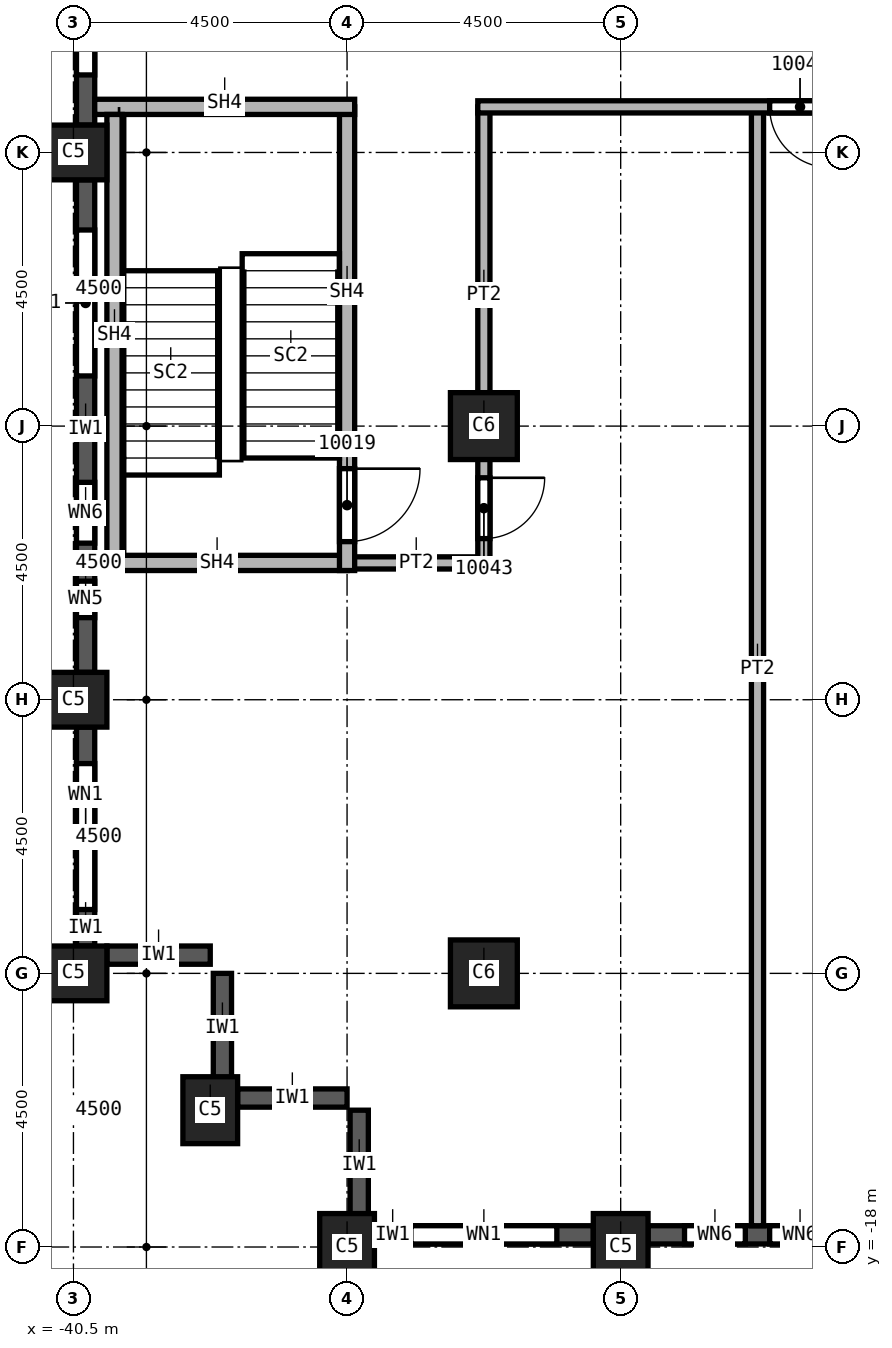
"""IFC4 building model, lengths in metres.
Left out: names, types, materials, properties, quantities, classifications, styles, units other than length and angle.
Written with IfcOpenShell. Run it as: python <this file> out.ifc"""

import sys

from ifc_helpers import new_model, si_unit, direction, frame, frame_2d, origin, origin_2d, place, context, subcontext, project, spatial, rectangle, extrude, element, fill, save


model = new_model("IFC4")
c1 = context("Model", 3, precision=1e-05, world=origin(), true_north=direction((0.0, 1.0)))
c2 = subcontext(c1, "Body", "Model", "MODEL_VIEW")
j1 = project(units=[si_unit("LENGTHUNIT", "METRE"), si_unit("PLANEANGLEUNIT", "RADIAN")], contexts=[c1])
p1 = place(None, origin())
s1 = spatial("IfcSite", under=j1, at=p1, CompositionType="ELEMENT")
p2 = place(p1, origin())
s2 = spatial("IfcBuilding", under=s1, at=p2, CompositionType="ELEMENT")
p3 = place(p2, frame((0.0, 0.0, 174.0)))
s3 = spatial("IfcBuildingStorey", under=s2, at=p3, CompositionType="ELEMENT", Elevation=174.0)
for number, where, z_axis, x_axis in (
    (1, (-40.5, 0.0, 0.0), (0.0, 0.0, 1.0), (0.0, 1.0, 0.0)),
    (2, (-40.5, -9.0, 0.0), (0.0, 0.0, 1.0), (0.0, 1.0, 0.0)),
    (3, (-40.5, -13.5, 0.0), (0.0, 0.0, 1.0), (0.0, 1.0, 0.0)),
    (4, (-38.25, -15.75, 0.0), (0.0, 0.0, 1.0), (1.0, 0.0, 0.0)),
    (5, (-31.5, -18.0, 0.0), (0.0, 0.0, 1.0), (1.0, 0.0, 0.0)),
    (6, (-36.0, -18.0, 0.0), (0.0, 0.0, 1.0), (1.0, 0.0, 0.0)),
):
    element("IfcColumn", number, at=place(p3, frame(where, z_axis=z_axis, x_axis=x_axis)), inside=s3, PredefinedType="COLUMN", context=c2, shape_type="SweptSolid", body=[
        extrude(rectangle(XDim=0.9, YDim=1.1, at=origin_2d()), origin(), (0.0, 0.0, 1.0), 3.59),
    ])
for number, where, z_axis, x_axis in (
    (7, (-33.75, -4.5, 0.0), (0.0, 0.0, 1.0), (1.0, 0.0, 0.0)),
    (8, (-33.75, -13.5, 0.0), (0.0, 0.0, 1.0), (1.0, 0.0, 0.0)),
):
    element("IfcColumn", number, at=place(p3, frame(where, z_axis=z_axis, x_axis=x_axis)), inside=s3, PredefinedType="COLUMN", context=c2, shape_type="SweptSolid", body=[
        extrude(rectangle(XDim=1.1, YDim=1.1, at=origin_2d()), origin(), (0.0, 0.0, 1.0), 3.59),
    ])
p4 = place(p3, frame((-39.95, -13.2, 0.0), z_axis=(0.0, 0.0, 1.0), x_axis=(1.0, 0.0, 0.0)))
e9 = element("IfcWall", 9, at=p4, inside=s3, PredefinedType="SOLIDWALL", context=c2, shape_type="SweptSolid", body=[
    extrude(rectangle(XDim=1.7, YDim=0.3, at=frame_2d((0.85, 0.0))), origin(), (0.0, 0.0, 1.0), 2.99),
])
for number, where, z_axis, x_axis in (
    (10, (-38.05, -15.3, 0.0), (0.0, 0.0, 1.0), (0.0, 1.0, 0.0)),
    (11, (-37.8, -15.55, 0.0), (0.0, 0.0, 1.0), (1.0, 0.0, 0.0)),
    (12, (-35.8, -17.55, 0.0), (0.0, 0.0, 1.0), (0.0, 1.0, 0.0)),
):
    element("IfcWall", number, at=place(p3, frame(where, z_axis=z_axis, x_axis=x_axis)), inside=s3, PredefinedType="SOLIDWALL", context=c2, shape_type="SweptSolid", body=[
        extrude(rectangle(XDim=1.8, YDim=0.3, at=frame_2d((0.9, 0.0))), origin(), (0.0, 0.0, 1.0), 2.99),
    ])
p5 = place(p3, frame((-40.3, 8.55, 0.0), z_axis=(0.0, 0.0, 1.0), x_axis=(0.0, -1.0, 0.0)))
e13 = element("IfcWall", 13, at=p5, inside=s3, PredefinedType="SOLIDWALL", context=c2, shape_type="SweptSolid", body=[
    extrude(rectangle(XDim=8.1, YDim=0.3, at=frame_2d((4.05, 0.0))), origin(), (0.0, 0.0, 1.0), 2.99),
])
p6 = place(p5, frame((0.825, 0.0, 0.8)))
e14 = element("IfcOpeningElement", 14, at=p6, cuts=e13, PredefinedType="OPENING", context=c2, shape_type="SweptSolid", body=[
    extrude(rectangle(XDim=2.4, YDim=1.95, at=frame_2d((1.2, 0.975))), frame((0.0, 0.15, 0.0), z_axis=(0.0, -1.0, 0.0), x_axis=(1.0, 0.0, 0.0)), (0.0, 0.0, 1.0), 0.3),
])
p7 = place(p5, frame((4.875, 0.0, 0.8)))
e15 = element("IfcOpeningElement", 15, at=p7, cuts=e13, PredefinedType="OPENING", context=c2, shape_type="SweptSolid", body=[
    extrude(rectangle(XDim=2.4, YDim=1.95, at=frame_2d((1.2, 0.975))), frame((0.0, 0.15, 0.0), z_axis=(0.0, -1.0, 0.0), x_axis=(1.0, 0.0, 0.0)), (0.0, 0.0, 1.0), 0.3),
])
p8 = place(p3, frame((-40.3, -0.45, 0.0), z_axis=(0.0, 0.0, 1.0), x_axis=(0.0, -1.0, 0.0)))
e16 = element("IfcWall", 16, at=p8, inside=s3, PredefinedType="SOLIDWALL", context=c2, shape_type="SweptSolid", body=[
    extrude(rectangle(XDim=8.1, YDim=0.3, at=frame_2d((4.05, 0.0))), origin(), (0.0, 0.0, 1.0), 2.99),
])
p9 = place(p8, frame((0.825, 0.0, 0.8)))
e17 = element("IfcOpeningElement", 17, at=p9, cuts=e16, PredefinedType="OPENING", context=c2, shape_type="SweptSolid", body=[
    extrude(rectangle(XDim=2.4, YDim=1.95, at=frame_2d((1.2, 0.975))), frame((0.0, 0.15, 0.0), z_axis=(0.0, -1.0, 0.0), x_axis=(1.0, 0.0, 0.0)), (0.0, 0.0, 1.0), 0.3),
])
p10 = place(p8, frame((4.975, 0.0, 0.8)))
e18 = element("IfcOpeningElement", 18, at=p10, cuts=e16, PredefinedType="OPENING", context=c2, shape_type="SweptSolid", body=[
    extrude(rectangle(XDim=1.0, YDim=1.95, at=frame_2d((0.5, 0.975))), frame((0.0, 0.15, 0.0), z_axis=(0.0, -1.0, 0.0), x_axis=(1.0, 0.0, 0.0)), (0.0, 0.0, 1.0), 0.3),
])
p11 = place(p8, frame((6.6, 0.0, 0.8)))
e19 = element("IfcOpeningElement", 19, at=p11, cuts=e16, PredefinedType="OPENING", context=c2, shape_type="SweptSolid", body=[
    extrude(rectangle(XDim=0.6, YDim=1.95, at=frame_2d((0.3, 0.975))), frame((0.0, 0.15, 0.0), z_axis=(0.0, -1.0, 0.0), x_axis=(1.0, 0.0, 0.0)), (0.0, 0.0, 1.0), 0.3),
])
p12 = place(p3, frame((-40.3, -9.45, 0.0), z_axis=(0.0, 0.0, 1.0), x_axis=(0.0, -1.0, 0.0)))
e20 = element("IfcWall", 20, at=p12, inside=s3, PredefinedType="SOLIDWALL", context=c2, shape_type="SweptSolid", body=[
    extrude(rectangle(XDim=3.6, YDim=0.3, at=frame_2d((1.8, 0.0))), origin(), (0.0, 0.0, 1.0), 2.99),
])
p13 = place(p12, frame((0.6, 0.0, 0.8)))
e21 = element("IfcOpeningElement", 21, at=p13, cuts=e20, PredefinedType="OPENING", context=c2, shape_type="SweptSolid", body=[
    extrude(rectangle(XDim=2.4, YDim=1.95, at=frame_2d((1.2, 0.975))), frame((0.0, 0.15, 0.0), z_axis=(0.0, -1.0, 0.0), x_axis=(1.0, 0.0, 0.0)), (0.0, 0.0, 1.0), 0.3),
])
p14 = place(p3, frame((-35.55, -17.8, 0.0), z_axis=(0.0, 0.0, 1.0), x_axis=(1.0, 0.0, 0.0)))
e22 = element("IfcWall", 22, at=p14, inside=s3, PredefinedType="SOLIDWALL", context=c2, shape_type="SweptSolid", body=[
    extrude(rectangle(XDim=3.6, YDim=0.3, at=frame_2d((1.8, 0.0))), origin(), (0.0, 0.0, 1.0), 2.99),
])
p15 = place(p14, frame((0.6, 0.0, 0.8)))
e23 = element("IfcOpeningElement", 23, at=p15, cuts=e22, PredefinedType="OPENING", context=c2, shape_type="SweptSolid", body=[
    extrude(rectangle(XDim=2.4, YDim=1.95, at=frame_2d((1.2, 0.975))), frame((0.0, 0.15, 0.0), z_axis=(0.0, -1.0, 0.0), x_axis=(1.0, 0.0, 0.0)), (0.0, 0.0, 1.0), 0.3),
])
p16 = place(p3, frame((-31.05, -17.8, 0.0), z_axis=(0.0, 0.0, 1.0), x_axis=(1.0, 0.0, 0.0)))
e24 = element("IfcWall", 24, at=p16, inside=s3, PredefinedType="SOLIDWALL", context=c2, shape_type="SweptSolid", body=[
    extrude(rectangle(XDim=3.6, YDim=0.3, at=frame_2d((1.8, 0.0))), origin(), (0.0, 0.0, 1.0), 2.99),
])
p17 = place(p16, frame((0.6, 0.0, 0.8)))
e25 = element("IfcOpeningElement", 25, at=p17, cuts=e24, PredefinedType="OPENING", context=c2, shape_type="SweptSolid", body=[
    extrude(rectangle(XDim=1.0, YDim=1.95, at=frame_2d((0.5, 0.975))), frame((0.0, 0.15, 0.0), z_axis=(0.0, -1.0, 0.0), x_axis=(1.0, 0.0, 0.0)), (0.0, 0.0, 1.0), 0.3),
])
p18 = place(p16, frame((2.0, 0.0, 0.8)))
e26 = element("IfcOpeningElement", 26, at=p18, cuts=e24, PredefinedType="OPENING", context=c2, shape_type="SweptSolid", body=[
    extrude(rectangle(XDim=1.0, YDim=1.95, at=frame_2d((0.5, 0.975))), frame((0.0, 0.15, 0.0), z_axis=(0.0, -1.0, 0.0), x_axis=(1.0, 0.0, 0.0)), (0.0, 0.0, 1.0), 0.3),
])
p19 = place(p3, frame((-33.75, -6.75, 0.0), z_axis=(0.0, 0.0, 1.0), x_axis=(-1.0, 0.0, 0.0)))
e27 = element("IfcWall", 27, at=p19, inside=s3, PredefinedType="PARTITIONING", context=c2, shape_type="SweptSolid", body=[
    extrude(rectangle(XDim=2.25, YDim=0.2, at=frame_2d((1.125, 0.0))), origin(), (0.0, 0.0, 1.0), 3.59),
])
p20 = place(p3, frame((-33.75, 0.75, 0.0), z_axis=(0.0, 0.0, 1.0), x_axis=(0.0, -1.0, 0.0)))
e28 = element("IfcWall", 28, at=p20, inside=s3, PredefinedType="PARTITIONING", context=c2, shape_type="SweptSolid", body=[
    extrude(rectangle(XDim=7.6, YDim=0.2, at=frame_2d((3.8, 0.0))), origin(), (0.0, 0.0, 1.0), 3.59),
])
p21 = place(p20, frame((6.1, 0.0, 0.0)))
e29 = element("IfcOpeningElement", 29, at=p21, cuts=e28, PredefinedType="OPENING", context=c2, shape_type="SweptSolid", body=[
    extrude(rectangle(XDim=1.0, YDim=2.1, at=frame_2d((0.5, 1.05))), frame((0.0, 0.1, 0.0), z_axis=(0.0, -1.0, 0.0), x_axis=(1.0, 0.0, 0.0)), (0.0, 0.0, 1.0), 0.2),
])
p22 = place(p3, frame((-29.25, 0.75, 0.0), z_axis=(0.0, 0.0, 1.0), x_axis=(0.0, -1.0, 0.0)))
e30 = element("IfcWall", 30, at=p22, inside=s3, PredefinedType="PARTITIONING", context=c2, shape_type="SweptSolid", body=[
    extrude(rectangle(XDim=18.4, YDim=0.2, at=frame_2d((9.2, 0.0))), origin(), (0.0, 0.0, 1.0), 3.59),
])
p23 = place(p3, frame((-15.4, 0.75, 0.0), z_axis=(0.0, 0.0, 1.0), x_axis=(-1.0, 0.0, 0.0)))
e31 = element("IfcWall", 31, at=p23, inside=s3, PredefinedType="PARTITIONING", context=c2, shape_type="SweptSolid", body=[
    extrude(rectangle(XDim=18.45, YDim=0.2, at=frame_2d((9.225, 0.0))), origin(), (0.0, 0.0, 1.0), 3.59),
])
p24 = place(p23, frame((3.55, 0.0, 0.0)))
e32 = element("IfcOpeningElement", 32, at=p24, cuts=e31, PredefinedType="OPENING", context=c2, shape_type="SweptSolid", body=[
    extrude(rectangle(XDim=1.0, YDim=2.1, at=frame_2d((0.5, 1.05))), frame((0.0, 0.1, 0.0), z_axis=(0.0, -1.0, 0.0), x_axis=(1.0, 0.0, 0.0)), (0.0, 0.0, 1.0), 0.2),
])
p25 = place(p23, frame((12.65, 0.0, 0.0)))
e33 = element("IfcOpeningElement", 33, at=p25, cuts=e31, PredefinedType="OPENING", context=c2, shape_type="SweptSolid", body=[
    extrude(rectangle(XDim=1.0, YDim=2.1, at=frame_2d((0.5, 1.05))), frame((0.0, 0.1, 0.0), z_axis=(0.0, -1.0, 0.0), x_axis=(1.0, 0.0, 0.0)), (0.0, 0.0, 1.0), 0.2),
])
p26 = place(p3, frame((-36.0, -6.75, 0.0), z_axis=(0.0, 0.0, 1.0), x_axis=(-1.0, 0.0, 0.0)))
e34 = element("IfcWall", 34, at=p26, inside=s3, PredefinedType="SOLIDWALL", context=c2, shape_type="SweptSolid", body=[
    extrude(rectangle(XDim=4.15, YDim=0.25, at=frame_2d((2.075, 0.0))), origin(), (0.0, 0.0, 1.0), 3.59),
])
p27 = place(p3, frame((-36.0, 0.75, 0.0), z_axis=(0.0, 0.0, 1.0), x_axis=(0.0, -1.0, 0.0)))
e35 = element("IfcWall", 35, at=p27, inside=s3, PredefinedType="SOLIDWALL", context=c2, shape_type="SweptSolid", body=[
    extrude(rectangle(XDim=7.625, YDim=0.25, at=frame_2d((3.812, 0.0))), origin(), (0.0, 0.0, 1.0), 3.59),
])
p28 = place(p27, frame((5.95, 0.0, 0.0)))
e36 = element("IfcOpeningElement", 36, at=p28, cuts=e35, PredefinedType="OPENING", context=c2, shape_type="SweptSolid", body=[
    extrude(rectangle(XDim=1.2, YDim=2.1, at=frame_2d((0.6, 1.05))), frame((0.0, 0.125, 0.0), z_axis=(0.0, -1.0, 0.0), x_axis=(1.0, 0.0, 0.0)), (0.0, 0.0, 1.0), 0.25),
])
p29 = place(p3, frame((-35.875, 0.75, 0.0), z_axis=(0.0, 0.0, 1.0), x_axis=(-1.0, 0.0, 0.0)))
e37 = element("IfcWall", 37, at=p29, inside=s3, PredefinedType="SOLIDWALL", context=c2, shape_type="SweptSolid", body=[
    extrude(rectangle(XDim=4.275, YDim=0.25, at=frame_2d((2.137, 0.0))), origin(), (0.0, 0.0, 1.0), 3.59),
])
p30 = place(p3, frame((-39.825, -6.625, 0.0), z_axis=(0.0, 0.0, 1.0), x_axis=(0.0, 1.0, 0.0)))
e38 = element("IfcWall", 38, at=p30, inside=s3, PredefinedType="SOLIDWALL", context=c2, shape_type="SweptSolid", body=[
    extrude(rectangle(XDim=7.25, YDim=0.25, at=frame_2d((3.625, 0.0))), origin(), (0.0, 0.0, 1.0), 3.59),
])
p31 = place(p7, origin())
e39 = element("IfcWindow", 39, at=p31, inside=s3, PartitioningType="SINGLE_PANEL", PredefinedType="WINDOW", context=c2, shape_type="SweptSolid", body=[
    extrude(rectangle(XDim=2.4, YDim=1.95, at=frame_2d((1.2, 0.975))), frame((0.0, 0.03, 0.0), z_axis=(0.0, -1.0, 0.0), x_axis=(1.0, 0.0, 0.0)), (0.0, 0.0, 1.0), 0.06),
])
fill(e15, e39)
p32 = place(p9, origin())
e40 = element("IfcWindow", 40, at=p32, inside=s3, PartitioningType="SINGLE_PANEL", PredefinedType="WINDOW", context=c2, shape_type="SweptSolid", body=[
    extrude(rectangle(XDim=2.4, YDim=1.95, at=frame_2d((1.2, 0.975))), frame((0.0, 0.03, 0.0), z_axis=(0.0, -1.0, 0.0), x_axis=(1.0, 0.0, 0.0)), (0.0, 0.0, 1.0), 0.06),
])
fill(e17, e40)
p33 = place(p13, origin())
e41 = element("IfcWindow", 41, at=p33, inside=s3, PartitioningType="SINGLE_PANEL", PredefinedType="WINDOW", context=c2, shape_type="SweptSolid", body=[
    extrude(rectangle(XDim=2.4, YDim=1.95, at=frame_2d((1.2, 0.975))), frame((0.0, 0.03, 0.0), z_axis=(0.0, -1.0, 0.0), x_axis=(1.0, 0.0, 0.0)), (0.0, 0.0, 1.0), 0.06),
])
fill(e21, e41)
p34 = place(p15, origin())
e42 = element("IfcWindow", 42, at=p34, inside=s3, PartitioningType="SINGLE_PANEL", PredefinedType="WINDOW", context=c2, shape_type="SweptSolid", body=[
    extrude(rectangle(XDim=2.4, YDim=1.95, at=frame_2d((1.2, 0.975))), frame((0.0, 0.03, 0.0), z_axis=(0.0, -1.0, 0.0), x_axis=(1.0, 0.0, 0.0)), (0.0, 0.0, 1.0), 0.06),
])
fill(e23, e42)
p35 = place(p28, origin())
e43 = element("IfcDoor", 43, at=p35, inside=s3, OperationType="SINGLE_SWING_RIGHT", PredefinedType="DOOR", context=c2, shape_type="SweptSolid", body=[
    extrude(rectangle(XDim=1.2, YDim=2.1, at=frame_2d((0.6, 1.05))), frame((0.0, 0.025, 0.0), z_axis=(0.0, -1.0, 0.0), x_axis=(1.0, 0.0, 0.0)), (0.0, 0.0, 1.0), 0.05),
])
fill(e36, e43)
p36 = place(p21, origin())
e44 = element("IfcDoor", 44, at=p36, inside=s3, OperationType="SINGLE_SWING_RIGHT", PredefinedType="DOOR", context=c2, shape_type="SweptSolid", body=[
    extrude(rectangle(XDim=1.0, YDim=2.1, at=frame_2d((0.5, 1.05))), frame((0.0, 0.025, 0.0), z_axis=(0.0, -1.0, 0.0), x_axis=(1.0, 0.0, 0.0)), (0.0, 0.0, 1.0), 0.05),
])
fill(e29, e44)
p37 = place(p25, origin())
e45 = element("IfcDoor", 45, at=p37, inside=s3, OperationType="SINGLE_SWING_LEFT", PredefinedType="DOOR", context=c2, shape_type="SweptSolid", body=[
    extrude(rectangle(XDim=1.0, YDim=2.1, at=frame_2d((0.5, 1.05))), frame((0.0, 0.025, 0.0), z_axis=(0.0, -1.0, 0.0), x_axis=(1.0, 0.0, 0.0)), (0.0, 0.0, 1.0), 0.05),
])
fill(e33, e45)
p38 = place(p10, origin())
e46 = element("IfcWindow", 46, at=p38, inside=s3, PartitioningType="SINGLE_PANEL", PredefinedType="WINDOW", context=c2, shape_type="SweptSolid", body=[
    extrude(rectangle(XDim=1.0, YDim=1.95, at=frame_2d((0.5, 0.975))), frame((0.0, 0.03, 0.0), z_axis=(0.0, -1.0, 0.0), x_axis=(1.0, 0.0, 0.0)), (0.0, 0.0, 1.0), 0.06),
])
fill(e18, e46)
p39 = place(p11, origin())
e47 = element("IfcWindow", 47, at=p39, inside=s3, PartitioningType="SINGLE_PANEL", PredefinedType="WINDOW", context=c2, shape_type="SweptSolid", body=[
    extrude(rectangle(XDim=0.6, YDim=1.95, at=frame_2d((0.3, 0.975))), frame((0.0, 0.03, 0.0), z_axis=(0.0, -1.0, 0.0), x_axis=(1.0, 0.0, 0.0)), (0.0, 0.0, 1.0), 0.06),
])
fill(e19, e47)
p40 = place(p17, origin())
e48 = element("IfcWindow", 48, at=p40, inside=s3, PartitioningType="SINGLE_PANEL", PredefinedType="WINDOW", context=c2, shape_type="SweptSolid", body=[
    extrude(rectangle(XDim=1.0, YDim=1.95, at=frame_2d((0.5, 0.975))), frame((0.0, 0.03, 0.0), z_axis=(0.0, -1.0, 0.0), x_axis=(1.0, 0.0, 0.0)), (0.0, 0.0, 1.0), 0.06),
])
fill(e25, e48)
p41 = place(p18, origin())
e49 = element("IfcWindow", 49, at=p41, inside=s3, PartitioningType="SINGLE_PANEL", PredefinedType="WINDOW", context=c2, shape_type="SweptSolid", body=[
    extrude(rectangle(XDim=1.0, YDim=1.95, at=frame_2d((0.5, 0.975))), frame((0.0, 0.03, 0.0), z_axis=(0.0, -1.0, 0.0), x_axis=(1.0, 0.0, 0.0)), (0.0, 0.0, 1.0), 0.06),
])
fill(e26, e49)
save(model, sys.argv[1])
